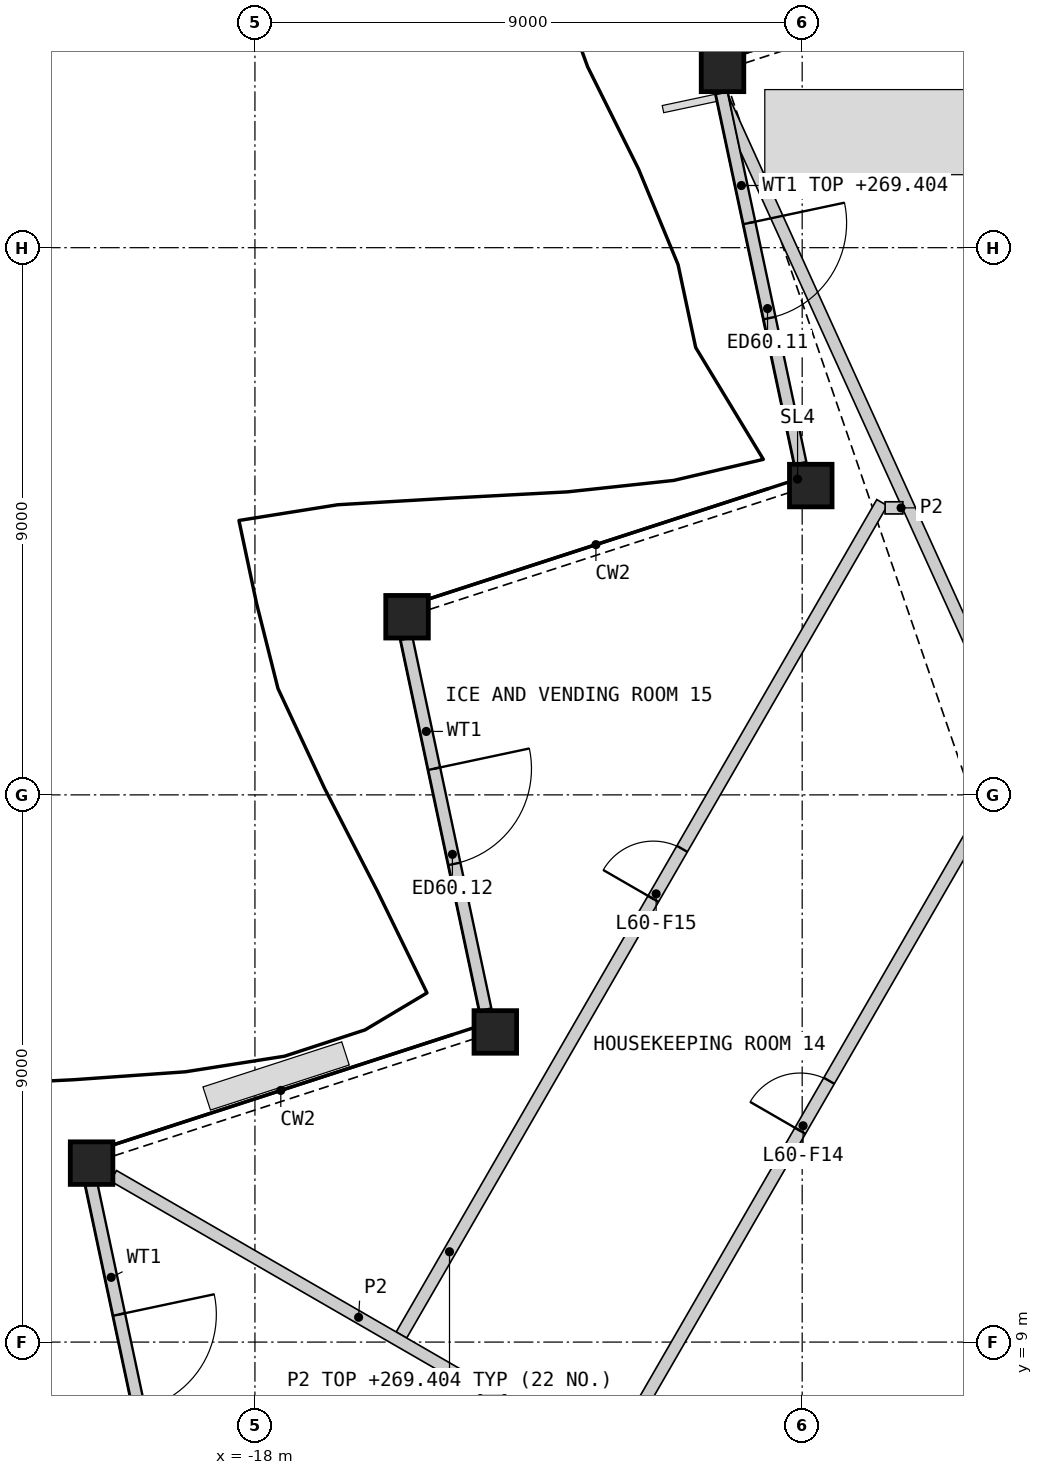
"""IFC4 building model, lengths in metres.
Left out: names, types, materials, properties, quantities, classifications, styles, units other than length and angle.
Written with IfcOpenShell. Run it as: python <this file> out.ifc"""

import sys

from ifc_helpers import new_model, si_unit, direction, frame, frame_2d, origin, origin_2d, place, context, subcontext, project, spatial, polyline, rectangle, hollow_rectangle, outline, extrude, element, fill, save


model = new_model("IFC4")
c1 = context("Model", 3, precision=1e-05, world=origin(), true_north=direction((0.0, 1.0)))
c2 = subcontext(c1, "Body", "Model", "MODEL_VIEW")
j1 = project(units=[si_unit("LENGTHUNIT", "METRE"), si_unit("PLANEANGLEUNIT", "RADIAN")], contexts=[c1])
p1 = place(None, origin())
s1 = spatial("IfcSite", under=j1, at=p1, CompositionType="ELEMENT")
p2 = place(p1, origin())
s2 = spatial("IfcBuilding", under=s1, at=p2, CompositionType="ELEMENT")
p3 = place(p2, frame((0.0, 0.0, 267.0)))
s3 = spatial("IfcBuildingStorey", under=s2, at=p3, CompositionType="ELEMENT", Elevation=267.0)
for number, where, z_axis, x_axis in (
    (1, (-10.31, 29.916, 0.0), (0.0, 0.0, 1.0), (1.0, 0.0, 0.0)),
    (2, (-8.859, 23.087, 0.0), (0.0, 0.0, 1.0), (1.0, 0.0, 0.0)),
    (3, (-15.499, 20.93, 0.0), (0.0, 0.0, 1.0), (1.0, 0.0, 0.0)),
    (4, (-14.047, 14.101, 0.0), (0.0, 0.0, 1.0), (1.0, 0.0, 0.0)),
    (5, (-20.687, 11.943, 0.0), (0.0, 0.0, 1.0), (1.0, 0.0, 0.0)),
):
    element("IfcColumn", number, at=place(p3, frame(where, z_axis=z_axis, x_axis=x_axis)), inside=s3, PredefinedType="COLUMN", context=c2, shape_type="SweptSolid", body=[
        extrude(hollow_rectangle(XDim=0.7, YDim=0.7, WallThickness=0.045, at=origin_2d()), origin(), (0.0, 0.0, 1.0), 3.6),
    ])
p4 = place(p3, frame((-10.324, 29.545, 0.0), z_axis=(0.0, 0.0, 1.0), x_axis=(0.207930490886, -0.978143604467, 0.0)))
e6 = element("IfcWall", 6, at=p4, inside=s3, PredefinedType="SOLIDWALL", context=c2, shape_type="SweptSolid", body=[
    extrude(rectangle(XDim=6.228, YDim=0.2, at=frame_2d((3.114, 0.0))), origin(), (0.0, 0.0, 1.0), 2.404),
])
p5 = place(p4, frame((2.186, 0.0, 0.0)))
e7 = element("IfcOpeningElement", 7, at=p5, cuts=e6, PredefinedType="OPENING", context=c2, shape_type="SweptSolid", body=[
    extrude(rectangle(XDim=1.6, YDim=2.4, at=frame_2d((0.8, 1.2))), frame((0.0, 0.11, 0.0), z_axis=(0.0, -1.0, 0.0), x_axis=(1.0, 0.0, 0.0)), (0.0, 0.0, 1.0), 0.22),
])
p6 = place(p3, frame((-15.506, 20.569, 0.0), z_axis=(0.0, 0.0, 1.0), x_axis=(0.207911652145, -0.978147608954, 0.0)))
e8 = element("IfcWall", 8, at=p6, inside=s3, PredefinedType="SOLIDWALL", context=c2, shape_type="SweptSolid", body=[
    extrude(rectangle(XDim=6.238, YDim=0.2, at=frame_2d((3.119, 0.0))), origin(), (0.0, 0.0, 1.0), 2.701),
])
p7 = place(p6, frame((2.186, 0.0, 0.0)))
e9 = element("IfcOpeningElement", 9, at=p7, cuts=e8, PredefinedType="OPENING", context=c2, shape_type="SweptSolid", body=[
    extrude(rectangle(XDim=1.6, YDim=2.4, at=frame_2d((0.8, 1.2))), frame((0.0, 0.11, 0.0), z_axis=(0.0, -1.0, 0.0), x_axis=(1.0, 0.0, 0.0)), (0.0, 0.0, 1.0), 0.22),
])
p8 = place(p3, frame((-20.689, 11.592, 0.0), z_axis=(0.0, 0.0, 1.0), x_axis=(0.207900820141, -0.978149911304, 0.0)))
e10 = element("IfcWall", 10, at=p8, inside=s3, PredefinedType="SOLIDWALL", context=c2, shape_type="SweptSolid", body=[
    extrude(rectangle(XDim=6.247, YDim=0.2, at=frame_2d((3.124, 0.0))), origin(), (0.0, 0.0, 1.0), 2.701),
])
p9 = place(p8, frame((2.186, 0.0, 0.0)))
e11 = element("IfcOpeningElement", 11, at=p9, cuts=e10, PredefinedType="OPENING", context=c2, shape_type="SweptSolid", body=[
    extrude(rectangle(XDim=1.6, YDim=2.4, at=frame_2d((0.8, 1.2))), frame((0.0, 0.11, 0.0), z_axis=(0.0, -1.0, 0.0), x_axis=(1.0, 0.0, 0.0)), (0.0, 0.0, 1.0), 0.22),
])
p10 = place(p3, frame((-4.636, 7.99, 0.0), z_axis=(0.0, 0.0, 1.0), x_axis=(-0.500022813292, -0.866012232124, 0.0)))
e12 = element("IfcWall", 12, at=p10, inside=s3, PredefinedType="SHEAR", context=c2, shape_type="SweptSolid", body=[
    extrude(rectangle(XDim=6.802, YDim=1.3, at=frame_2d((3.401, 0.0))), origin(), (0.0, 0.0, 1.0), 3.25),
])
p11 = place(p3, frame((-18.976, -4.747, 0.0), z_axis=(0.0, 0.0, 1.0), x_axis=(0.499999852422, 0.866025488988, 0.0)))
e13 = element("IfcWall", 13, at=p11, inside=s3, PredefinedType="PARTITIONING", context=c2, shape_type="SweptSolid", body=[
    extrude(rectangle(XDim=27.198, YDim=0.2, at=frame_2d((13.599, 0.0))), origin(), (0.0, 0.0, 1.0), 3.25),
])
p12 = place(p11, frame((19.886, 0.0, 0.0)))
e14 = element("IfcOpeningElement", 14, at=p12, cuts=e13, PredefinedType="OPENING", context=c2, shape_type="SweptSolid", body=[
    extrude(rectangle(XDim=0.95, YDim=2.1, at=frame_2d((0.475, 1.05))), frame((0.0, 0.11, 0.0), z_axis=(0.0, -1.0, 0.0), x_axis=(1.0, 0.0, 0.0)), (0.0, 0.0, 1.0), 0.22),
])
p13 = place(p11, frame((11.895, 0.0, 0.0)))
e15 = element("IfcOpeningElement", 15, at=p13, cuts=e13, PredefinedType="OPENING", context=c2, shape_type="SweptSolid", body=[
    extrude(rectangle(XDim=1.1, YDim=2.1, at=frame_2d((0.55, 1.05))), frame((0.0, 0.11, 0.0), z_axis=(0.0, -1.0, 0.0), x_axis=(1.0, 0.0, 0.0)), (0.0, 0.0, 1.0), 0.22),
])
p14 = place(p11, frame((1.152, 0.0, 0.0)))
e16 = element("IfcOpeningElement", 16, at=p14, cuts=e13, PredefinedType="OPENING", context=c2, shape_type="SweptSolid", body=[
    extrude(rectangle(XDim=0.95, YDim=2.1, at=frame_2d((0.475, 1.05))), frame((0.0, 0.11, 0.0), z_axis=(0.0, -1.0, 0.0), x_axis=(1.0, 0.0, 0.0)), (0.0, 0.0, 1.0), 0.22),
])
p15 = place(p3, frame((-15.591, 9.117, 0.0), z_axis=(0.0, 0.0, 1.0), x_axis=(0.499994281579, 0.866028705291, 0.0)))
e17 = element("IfcWall", 17, at=p15, inside=s3, PredefinedType="PARTITIONING", context=c2, shape_type="SweptSolid", body=[
    extrude(rectangle(XDim=15.808, YDim=0.2, at=frame_2d((7.904, 0.0))), origin(), (0.0, 0.0, 1.0), 2.404),
])
p16 = place(p15, frame((8.283, 0.0, 0.0)))
e18 = element("IfcOpeningElement", 18, at=p16, cuts=e17, PredefinedType="OPENING", context=c2, shape_type="SweptSolid", body=[
    extrude(rectangle(XDim=0.95, YDim=2.1, at=frame_2d((0.475, 1.05))), frame((0.0, 0.11, 0.0), z_axis=(0.0, -1.0, 0.0), x_axis=(1.0, 0.0, 0.0)), (0.0, 0.0, 1.0), 0.22),
])
p17 = place(p3, origin())
e19 = element("IfcWall", 19, at=p17, inside=s3, PredefinedType="PARTITIONING", context=c2, shape_type="SweptSolid", body=[
    extrude(outline(polyline([(-5.56, 18.77), (-10.017, 28.582), (-10.21, 29.491), (-5.377, 18.853), (-5.56, 18.77)])), origin(), (0.0, 0.0, 1.0), 2.404),
])
p18 = place(p3, frame((-20.327, 11.736, 0.0), z_axis=(0.0, 0.0, 1.0), x_axis=(0.866022277917, -0.500005414122, 0.0)))
e20 = element("IfcWall", 20, at=p18, inside=s3, PredefinedType="PARTITIONING", context=c2, shape_type="SweptSolid", body=[
    extrude(rectangle(XDim=9.311, YDim=0.2, at=frame_2d((4.656, 0.0))), origin(), (0.0, 0.0, 1.0), 2.404),
])
p19 = place(p3, frame((-7.636, 22.72, 0.0), z_axis=(0.0, 0.0, 1.0), x_axis=(1.0, 0.0, 0.0)))
e21 = element("IfcWall", 21, at=p19, inside=s3, PredefinedType="PARTITIONING", context=c2, shape_type="SweptSolid", body=[
    extrude(rectangle(XDim=0.292, YDim=0.2, at=frame_2d((0.146, 0.0))), origin(), (0.0, 0.0, 1.0), 2.404),
])
p20 = place(p5, origin())
e22 = element("IfcDoor", 22, at=p20, inside=s3, OperationType="DOUBLE_DOOR_SINGLE_SWING", PredefinedType="DOOR", context=c2, shape_type="SweptSolid", body=[
    extrude(rectangle(XDim=1.6, YDim=2.4, at=frame_2d((0.8, 1.2))), frame((0.0, 0.025, 0.0), z_axis=(0.0, -1.0, 0.0), x_axis=(1.0, 0.0, 0.0)), (0.0, 0.0, 1.0), 0.05),
])
fill(e7, e22)
p21 = place(p7, origin())
e23 = element("IfcDoor", 23, at=p21, inside=s3, OperationType="DOUBLE_DOOR_SINGLE_SWING", PredefinedType="DOOR", context=c2, shape_type="SweptSolid", body=[
    extrude(rectangle(XDim=1.6, YDim=2.4, at=frame_2d((0.8, 1.2))), frame((0.0, 0.025, 0.0), z_axis=(0.0, -1.0, 0.0), x_axis=(1.0, 0.0, 0.0)), (0.0, 0.0, 1.0), 0.05),
])
fill(e9, e23)
p22 = place(p9, origin())
e24 = element("IfcDoor", 24, at=p22, inside=s3, OperationType="DOUBLE_DOOR_SINGLE_SWING", PredefinedType="DOOR", context=c2, shape_type="SweptSolid", body=[
    extrude(rectangle(XDim=1.6, YDim=2.4, at=frame_2d((0.8, 1.2))), frame((0.0, 0.025, 0.0), z_axis=(0.0, -1.0, 0.0), x_axis=(1.0, 0.0, 0.0)), (0.0, 0.0, 1.0), 0.05),
])
fill(e11, e24)
p23 = place(p12, origin())
e25 = element("IfcDoor", 25, at=p23, inside=s3, OperationType="SINGLE_SWING_LEFT", PredefinedType="DOOR", context=c2, shape_type="SweptSolid", body=[
    extrude(rectangle(XDim=0.95, YDim=2.1, at=frame_2d((0.475, 1.05))), frame((0.0, 0.025, 0.0), z_axis=(0.0, -1.0, 0.0), x_axis=(1.0, 0.0, 0.0)), (0.0, 0.0, 1.0), 0.05),
])
fill(e14, e25)
p24 = place(p16, origin())
e26 = element("IfcDoor", 26, at=p24, inside=s3, OperationType="SINGLE_SWING_LEFT", PredefinedType="DOOR", context=c2, shape_type="SweptSolid", body=[
    extrude(rectangle(XDim=0.95, YDim=2.1, at=frame_2d((0.475, 1.05))), frame((0.0, 0.025, 0.0), z_axis=(0.0, -1.0, 0.0), x_axis=(1.0, 0.0, 0.0)), (0.0, 0.0, 1.0), 0.05),
])
fill(e18, e26)
save(model, sys.argv[1])
